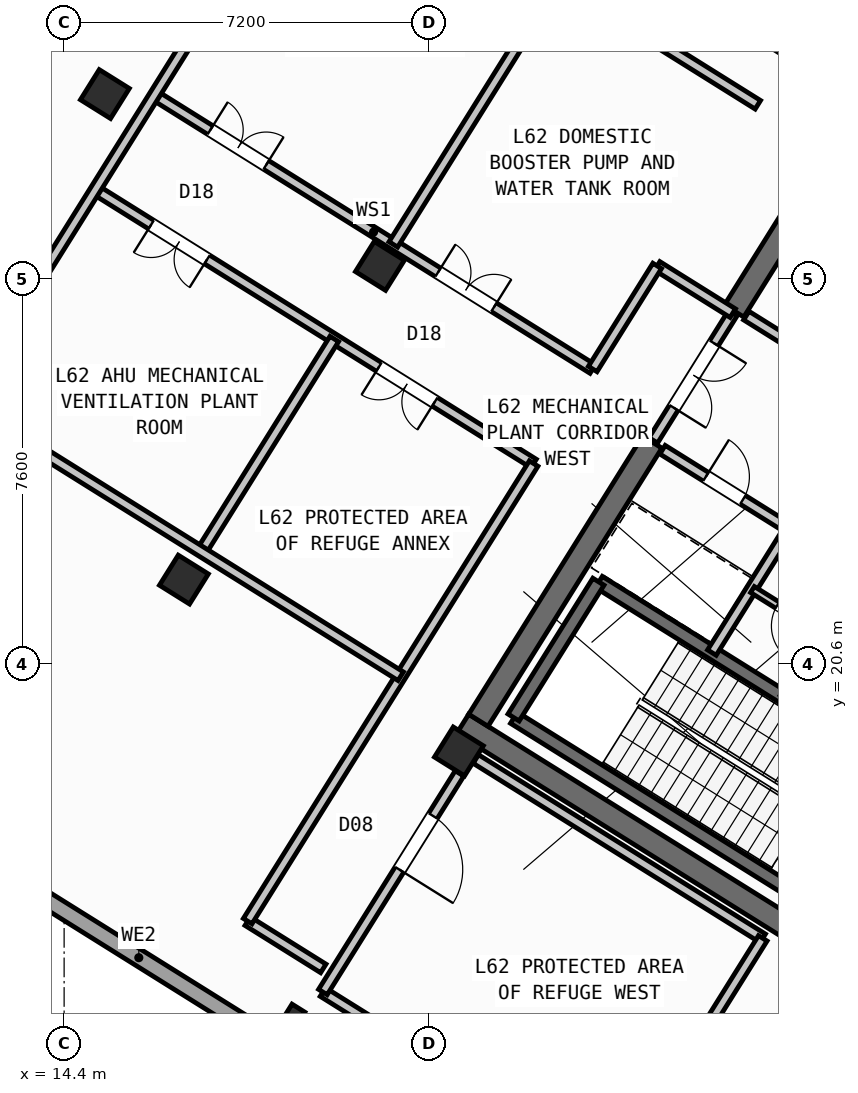
"""IFC4 building model, lengths in metres.
Left out: names, types, materials, properties, quantities, classifications, styles, units other than length and angle.
Written with IfcOpenShell. Run it as: python <this file> out.ifc"""

import sys

from ifc_helpers import new_model, si_unit, direction, frame, frame_2d, origin, origin_2d, place, context, subcontext, project, spatial, rectangle, hollow_rectangle, i_section, extrude, source, transform, mapped, element, fill, save


model = new_model("IFC4")
c1 = context("Model", 3, precision=1e-05, world=origin(), true_north=direction((0.0, 1.0)))
c2 = subcontext(c1, "Body", "Model", "MODEL_VIEW")
j1 = project(units=[si_unit("LENGTHUNIT", "METRE"), si_unit("PLANEANGLEUNIT", "RADIAN")], contexts=[c1])
p1 = place(None, origin())
s1 = spatial("IfcSite", under=j1, at=p1, CompositionType="ELEMENT")
p2 = place(p1, origin())
s2 = spatial("IfcBuilding", under=s1, at=p2, CompositionType="ELEMENT")
p3 = place(p2, frame((0.0, 0.0, 245.7)))
s3 = spatial("IfcBuildingStorey", under=s2, at=p3, CompositionType="ELEMENT", Elevation=245.7)
p4 = place(p3, frame((33.324, 12.503, 0.0), z_axis=(0.0, 0.0, 1.0), x_axis=(-0.848043529849, 0.529926571782, 0.0)))
e1 = element("IfcWall", 1, at=p4, inside=s3, PredefinedType="SHEAR", context=c2, shape_type="SweptSolid", body=[
    extrude(rectangle(XDim=13.04, YDim=0.45, at=frame_2d((6.52, 0.0))), origin(), (0.0, 0.0, 1.0), 5.15),
])
p5 = place(p3, frame((29.544, 30.636, 0.0), z_axis=(0.0, 0.0, 1.0), x_axis=(-0.529902075036, -0.848058836916, 0.0)))
e2 = element("IfcWall", 2, at=p5, inside=s3, PredefinedType="SHEAR", context=c2, shape_type="SweptSolid", body=[
    extrude(rectangle(XDim=3.625, YDim=0.45, at=frame_2d((1.812, 0.0))), origin(), (0.0, 0.0, 1.0), 5.15),
])
p6 = place(p3, frame((26.007, 24.976, 0.0), z_axis=(0.0, 0.0, 1.0), x_axis=(-0.529931155655, -0.848040665456, 0.0)))
e3 = element("IfcWall", 3, at=p6, inside=s3, PredefinedType="SHEAR", context=c2, shape_type="SweptSolid", body=[
    extrude(rectangle(XDim=6.475, YDim=0.45, at=frame_2d((3.238, 0.0))), origin(), (0.0, 0.0, 1.0), 5.15),
])
m1 = source(origin(), c2, "Body", "SweptSolid", [
    extrude(hollow_rectangle(XDim=0.7, YDim=0.7, WallThickness=0.028, at=origin_2d()), origin(), (0.0, 0.0, 1.0), 5.4),
])
p7 = place(p3, frame((22.191, 18.87, 0.0), z_axis=(0.0, 0.0, 1.0), x_axis=(-0.848048096156, 0.529919264233, 0.0)))
e4 = element("IfcColumn", 4, at=p7, inside=s3, PredefinedType="COLUMN", context=c2, shape_type="MappedRepresentation", body=[
    mapped(m1, transform((0.0, 0.0, 0.0), scale=1.0)),
])
m2 = source(origin(), c2, "Body", "SweptSolid", [
    extrude(i_section(OverallWidth=0.3, OverallDepth=0.45, WebThickness=0.014, FlangeThickness=0.026, at=origin_2d()), origin(), (0.0, 0.0, 1.0), 5.4),
])
p8 = place(p3, frame((18.906, 13.612, 0.0), z_axis=(0.0, 0.0, 1.0), x_axis=(-0.848048096156, 0.529919264233, 0.0)))
e5 = element("IfcColumn", 5, at=p8, inside=s3, PredefinedType="COLUMN", context=c2, shape_type="MappedRepresentation", body=[
    mapped(m2, transform((0.0, 0.0, 0.0), scale=1.0)),
])
for number, where, z_axis, x_axis in (
    (6, (20.632, 28.452, 0.0), (0.0, 0.0, 1.0), (-0.848, 0.53, 0.0)),
    (7, (16.764, 22.261, 0.0), (0.0, 0.0, 1.0), (-0.848, 0.53, 0.0)),
    (8, (15.205, 31.844, 0.0), (0.0, 0.0, 1.0), (-0.848, 0.53, 0.0)),
):
    element("IfcColumn", number, at=place(p3, frame(where, z_axis=z_axis, x_axis=x_axis)), inside=s3, PredefinedType="COLUMN", context=c2, shape_type="MappedRepresentation", body=[
        mapped(m1, transform((0.0, 0.0, 0.0), scale=1.0)),
    ])
p9 = place(p3, frame((29.268, 6.429, 0.0), z_axis=(0.0, 0.0, 1.0), x_axis=(-0.848049971435, 0.529916263149, 0.0)))
e9 = element("IfcWall", 9, at=p9, inside=s3, PredefinedType="STANDARD", context=c2, shape_type="SweptSolid", body=[
    extrude(rectangle(XDim=31.588, YDim=0.32, at=frame_2d((15.794, 0.0))), origin(), (0.0, 0.0, 1.0), 5.15),
])
p10 = place(p9, frame((5.782, 0.0, 0.85)))
e10 = element("IfcOpeningElement", 10, at=p10, cuts=e9, PredefinedType="OPENING", context=c2, shape_type="SweptSolid", body=[
    extrude(rectangle(XDim=1.7, YDim=1.6, at=frame_2d((0.85, 0.8))), frame((0.0, 0.17, 0.0), z_axis=(0.0, -1.0, 0.0), x_axis=(1.0, 0.0, 0.0)), (0.0, 0.0, 1.0), 0.34),
])
p11 = place(p3, frame((14.138, 41.825, 0.0), z_axis=(0.0, 0.0, 1.0), x_axis=(0.848046498049, -0.529921821731, 0.0)))
e11 = element("IfcWall", 11, at=p11, inside=s3, PredefinedType="STANDARD", context=c2, shape_type="SweptSolid", body=[
    extrude(rectangle(XDim=31.588, YDim=0.32, at=frame_2d((15.794, 0.0))), origin(), (0.0, 0.0, 1.0), 5.15),
])
p12 = place(p11, frame((2.144, 0.0, 0.85)))
e12 = element("IfcOpeningElement", 12, at=p12, cuts=e11, PredefinedType="OPENING", context=c2, shape_type="SweptSolid", body=[
    extrude(rectangle(XDim=1.7, YDim=1.6, at=frame_2d((0.85, 0.8))), frame((0.0, 0.17, 0.0), z_axis=(0.0, -1.0, 0.0), x_axis=(1.0, 0.0, 0.0)), (0.0, 0.0, 1.0), 0.34),
])
p13 = place(p11, frame((8.544, 0.0, 0.85)))
e13 = element("IfcOpeningElement", 13, at=p13, cuts=e11, PredefinedType="OPENING", context=c2, shape_type="SweptSolid", body=[
    extrude(rectangle(XDim=1.7, YDim=1.6, at=frame_2d((0.85, 0.8))), frame((0.0, 0.17, 0.0), z_axis=(0.0, -1.0, 0.0), x_axis=(1.0, 0.0, 0.0)), (0.0, 0.0, 1.0), 0.34),
])
p14 = place(p11, frame((14.944, 0.0, 0.85)))
e14 = element("IfcOpeningElement", 14, at=p14, cuts=e11, PredefinedType="OPENING", context=c2, shape_type="SweptSolid", body=[
    extrude(rectangle(XDim=1.7, YDim=1.6, at=frame_2d((0.85, 0.8))), frame((0.0, 0.17, 0.0), z_axis=(0.0, -1.0, 0.0), x_axis=(1.0, 0.0, 0.0)), (0.0, 0.0, 1.0), 0.34),
])
p15 = place(p11, frame((24.408, 0.0, 0.85)))
e15 = element("IfcOpeningElement", 15, at=p15, cuts=e11, PredefinedType="OPENING", context=c2, shape_type="SweptSolid", body=[
    extrude(rectangle(XDim=1.7, YDim=1.6, at=frame_2d((0.85, 0.8))), frame((0.0, 0.17, 0.0), z_axis=(0.0, -1.0, 0.0), x_axis=(1.0, 0.0, 0.0)), (0.0, 0.0, 1.0), 0.34),
])
p16 = place(p3, frame((29.605, 15.581, 0.0), z_axis=(0.0, 0.0, 1.0), x_axis=(-0.848036911448, 0.529937163087, 0.0)))
e16 = element("IfcWall", 16, at=p16, inside=s3, PredefinedType="SHEAR", context=c2, shape_type="SweptSolid", body=[
    extrude(rectangle(XDim=7.46, YDim=0.26, at=frame_2d((3.73, 0.0))), origin(), (0.0, 0.0, 1.0), 5.15),
])
p17 = place(p3, frame((31.28, 18.261, 0.0), z_axis=(0.0, 0.0, 1.0), x_axis=(-0.848051618787, 0.529913626805, 0.0)))
e17 = element("IfcWall", 17, at=p17, inside=s3, PredefinedType="SHEAR", context=c2, shape_type="SweptSolid", body=[
    extrude(rectangle(XDim=7.46, YDim=0.26, at=frame_2d((3.73, 0.0))), origin(), (0.0, 0.0, 1.0), 5.15),
])
p18 = place(p17, frame((0.36, 0.0, 0.0)))
e18 = element("IfcOpeningElement", 18, at=p18, cuts=e17, PredefinedType="OPENING", context=c2, shape_type="SweptSolid", body=[
    extrude(rectangle(XDim=0.86, YDim=2.05, at=frame_2d((0.43, 1.025))), frame((0.0, 0.14, 0.0), z_axis=(0.0, -1.0, 0.0), x_axis=(1.0, 0.0, 0.0)), (0.0, 0.0, 1.0), 0.28),
])
p19 = place(p3, frame((24.945, 22.22, 0.0), z_axis=(0.0, 0.0, 1.0), x_axis=(-0.529908658664, -0.84805472316, 0.0)))
e19 = element("IfcWall", 19, at=p19, inside=s3, PredefinedType="SHEAR", context=c2, shape_type="SweptSolid", body=[
    extrude(rectangle(XDim=3.16, YDim=0.26, at=frame_2d((1.58, 0.0))), origin(), (0.0, 0.0, 1.0), 5.15),
])
p20 = place(p3, frame((31.822, 24.998, 0.0), z_axis=(0.0, 0.0, 1.0), x_axis=(-0.848054125777, 0.529909614701, 0.0)))
e20 = element("IfcWall", 20, at=p20, inside=s3, PredefinedType="STANDARD", context=c2, shape_type="SweptSolid", body=[
    extrude(rectangle(XDim=4.668, YDim=0.2, at=frame_2d((2.334, 0.0))), origin(), (0.0, 0.0, 1.0), 5.14),
])
p21 = place(p20, frame((0.52, 0.0, 0.0)))
e21 = element("IfcOpeningElement", 21, at=p21, cuts=e20, PredefinedType="OPENING", context=c2, shape_type="SweptSolid", body=[
    extrude(rectangle(XDim=1.2, YDim=2.15, at=frame_2d((0.6, 1.075))), frame((0.0, 0.11, 0.0), z_axis=(0.0, -1.0, 0.0), x_axis=(1.0, 0.0, 0.0)), (0.0, 0.0, 1.0), 0.22),
])
p22 = place(p20, frame((2.54, 0.0, 0.0)))
e22 = element("IfcOpeningElement", 22, at=p22, cuts=e20, PredefinedType="OPENING", context=c2, shape_type="SweptSolid", body=[
    extrude(rectangle(XDim=1.2, YDim=2.15, at=frame_2d((0.6, 1.075))), frame((0.0, 0.11, 0.0), z_axis=(0.0, -1.0, 0.0), x_axis=(1.0, 0.0, 0.0)), (0.0, 0.0, 1.0), 0.22),
])
p23 = place(p3, frame((28.71, 23.263, 0.0), z_axis=(0.0, 0.0, 1.0), x_axis=(-0.529907497854, -0.848055448493, 0.0)))
e23 = element("IfcWall", 23, at=p23, inside=s3, PredefinedType="STANDARD", context=c2, shape_type="SweptSolid", body=[
    extrude(rectangle(XDim=2.88, YDim=0.2, at=frame_2d((1.44, 0.0))), origin(), (0.0, 0.0, 1.0), 5.14),
])
p24 = place(p3, frame((31.525, 21.504, 0.0), z_axis=(0.0, 0.0, 1.0), x_axis=(-0.848042066329, 0.529928913853, 0.0)))
e24 = element("IfcWall", 24, at=p24, inside=s3, PredefinedType="STANDARD", context=c2, shape_type="SweptSolid", body=[
    extrude(rectangle(XDim=6.268, YDim=0.2, at=frame_2d((3.134, 0.0))), origin(), (0.0, 0.0, 1.0), 5.14),
])
p25 = place(p24, frame((4.4, 0.0, 0.0)))
e25 = element("IfcOpeningElement", 25, at=p25, cuts=e24, PredefinedType="OPENING", context=c2, shape_type="SweptSolid", body=[
    extrude(rectangle(XDim=0.86, YDim=2.05, at=frame_2d((0.43, 1.025))), frame((0.0, 0.11, 0.0), z_axis=(0.0, -1.0, 0.0), x_axis=(1.0, 0.0, 0.0)), (0.0, 0.0, 1.0), 0.22),
])
p26 = place(p24, frame((0.35, 0.0, 0.0)))
e26 = element("IfcOpeningElement", 26, at=p26, cuts=e24, PredefinedType="OPENING", context=c2, shape_type="SweptSolid", body=[
    extrude(rectangle(XDim=0.86, YDim=2.05, at=frame_2d((0.43, 1.025))), frame((0.0, 0.11, 0.0), z_axis=(0.0, -1.0, 0.0), x_axis=(1.0, 0.0, 0.0)), (0.0, 0.0, 1.0), 0.22),
])
p27 = place(p3, frame((30.766, 20.327, 0.0), z_axis=(0.0, 0.0, 1.0), x_axis=(-0.848052663127, 0.529911955482, 0.0)))
e27 = element("IfcWall", 27, at=p27, inside=s3, PredefinedType="PLUMBINGWALL", context=c2, shape_type="SweptSolid", body=[
    extrude(rectangle(XDim=3.28, YDim=0.14, at=frame_2d((1.64, 0.0))), origin(), (0.0, 0.0, 1.0), 5.14),
])
p28 = place(p27, frame((0.25, 0.0, 0.0)))
e28 = element("IfcOpeningElement", 28, at=p28, cuts=e27, PredefinedType="OPENING", context=c2, shape_type="SweptSolid", body=[
    extrude(rectangle(XDim=0.78, YDim=2.05, at=frame_2d((0.39, 1.025))), frame((0.0, 0.08, 0.0), z_axis=(0.0, -1.0, 0.0), x_axis=(1.0, 0.0, 0.0)), (0.0, 0.0, 1.0), 0.16),
])
p29 = place(p27, frame((1.92, 0.0, 0.0)))
e29 = element("IfcOpeningElement", 29, at=p29, cuts=e27, PredefinedType="OPENING", context=c2, shape_type="SweptSolid", body=[
    extrude(rectangle(XDim=0.78, YDim=2.05, at=frame_2d((0.39, 1.025))), frame((0.0, 0.08, 0.0), z_axis=(0.0, -1.0, 0.0), x_axis=(1.0, 0.0, 0.0)), (0.0, 0.0, 1.0), 0.16),
])
p30 = place(p3, frame((24.832, 26.417, 0.0), z_axis=(0.0, 0.0, 1.0), x_axis=(-0.848045364107, 0.529923636401, 0.0)))
e30 = element("IfcWall", 30, at=p30, inside=s3, PredefinedType="STANDARD", context=c2, shape_type="SweptSolid", body=[
    extrude(rectangle(XDim=10.2, YDim=0.2, at=frame_2d((5.1, 0.0))), origin(), (0.0, 0.0, 1.0), 5.14),
])
p31 = place(p30, frame((2.3, 0.0, 0.0)))
e31 = element("IfcOpeningElement", 31, at=p31, cuts=e30, PredefinedType="OPENING", context=c2, shape_type="SweptSolid", body=[
    extrude(rectangle(XDim=1.3, YDim=2.15, at=frame_2d((0.65, 1.075))), frame((0.0, 0.11, 0.0), z_axis=(0.0, -1.0, 0.0), x_axis=(1.0, 0.0, 0.0)), (0.0, 0.0, 1.0), 0.22),
])
p32 = place(p30, frame((7.6, 0.0, 0.0)))
e32 = element("IfcOpeningElement", 32, at=p32, cuts=e30, PredefinedType="OPENING", context=c2, shape_type="SweptSolid", body=[
    extrude(rectangle(XDim=1.3, YDim=2.15, at=frame_2d((0.65, 1.075))), frame((0.0, 0.11, 0.0), z_axis=(0.0, -1.0, 0.0), x_axis=(1.0, 0.0, 0.0)), (0.0, 0.0, 1.0), 0.22),
])
p33 = place(p3, frame((23.666, 24.552, 0.0), z_axis=(0.0, 0.0, 1.0), x_axis=(-0.848038642463, 0.529934393004, 0.0)))
e33 = element("IfcWall", 33, at=p33, inside=s3, PredefinedType="STANDARD", context=c2, shape_type="SweptSolid", body=[
    extrude(rectangle(XDim=10.2, YDim=0.2, at=frame_2d((5.1, 0.0))), origin(), (0.0, 0.0, 1.0), 5.14),
])
p34 = place(p33, frame((2.3, 0.0, 0.0)))
e34 = element("IfcOpeningElement", 34, at=p34, cuts=e33, PredefinedType="OPENING", context=c2, shape_type="SweptSolid", body=[
    extrude(rectangle(XDim=1.3, YDim=2.15, at=frame_2d((0.65, 1.075))), frame((0.0, 0.11, 0.0), z_axis=(0.0, -1.0, 0.0), x_axis=(1.0, 0.0, 0.0)), (0.0, 0.0, 1.0), 0.22),
])
p35 = place(p33, frame((7.6, 0.0, 0.0)))
e35 = element("IfcOpeningElement", 35, at=p35, cuts=e33, PredefinedType="OPENING", context=c2, shape_type="SweptSolid", body=[
    extrude(rectangle(XDim=1.3, YDim=2.15, at=frame_2d((0.65, 1.075))), frame((0.0, 0.11, 0.0), z_axis=(0.0, -1.0, 0.0), x_axis=(1.0, 0.0, 0.0)), (0.0, 0.0, 1.0), 0.22),
])
p36 = place(p3, frame((19.441, 37.038, 0.0), z_axis=(0.0, 0.0, 1.0), x_axis=(-0.529936237412, -0.848037489901, 0.0)))
e36 = element("IfcWall", 36, at=p36, inside=s3, PredefinedType="STANDARD", context=c2, shape_type="SweptSolid", body=[
    extrude(rectangle(XDim=13.3, YDim=0.2, at=frame_2d((6.65, 0.0))), origin(), (0.0, 0.0, 1.0), 5.14),
])
p37 = place(p3, frame((27.596, 27.52, 0.0), z_axis=(0.0, 0.0, 1.0), x_axis=(-0.529865479138, -0.848081702443, 0.0)))
e37 = element("IfcWall", 37, at=p37, inside=s3, PredefinedType="STANDARD", context=c2, shape_type="SweptSolid", body=[
    extrude(rectangle(XDim=2.96, YDim=0.2, at=frame_2d((1.48, 0.0))), origin(), (0.0, 0.0, 1.0), 5.14),
])
p38 = place(p37, frame((0.7, 0.0, 0.0)))
e38 = element("IfcOpeningElement", 38, at=p38, cuts=e37, PredefinedType="OPENING", context=c2, shape_type="SweptSolid", body=[
    extrude(rectangle(XDim=1.5, YDim=2.15, at=frame_2d((0.75, 1.075))), frame((0.0, 0.11, 0.0), z_axis=(0.0, -1.0, 0.0), x_axis=(1.0, 0.0, 0.0)), (0.0, 0.0, 1.0), 0.22),
])
p39 = place(p3, frame((28.188, 15.182, 0.0), z_axis=(0.0, 0.0, 1.0), x_axis=(-0.848049646362, 0.529916783378, 0.0)))
e39 = element("IfcWall", 39, at=p39, inside=s3, PredefinedType="STANDARD", context=c2, shape_type="SweptSolid", body=[
    extrude(rectangle(XDim=6.678, YDim=0.2, at=frame_2d((3.339, 0.0))), origin(), (0.0, 0.0, 1.0), 5.14),
])
p40 = place(p3, frame((25.273, 10.517, 0.0), z_axis=(0.0, 0.0, 1.0), x_axis=(-0.848048724775, 0.529918258231, 0.0)))
e40 = element("IfcWall", 40, at=p40, inside=s3, PredefinedType="STANDARD", context=c2, shape_type="SweptSolid", body=[
    extrude(rectangle(XDim=6.8, YDim=0.2, at=frame_2d((3.4, 0.0))), origin(), (0.0, 0.0, 1.0), 5.14),
])
p41 = place(p3, frame((28.188, 15.182, 0.0), z_axis=(0.0, 0.0, 1.0), x_axis=(-0.52991514706, -0.848050668838, 0.0)))
e41 = element("IfcWall", 41, at=p41, inside=s3, PredefinedType="STANDARD", context=c2, shape_type="SweptSolid", body=[
    extrude(rectangle(XDim=5.5, YDim=0.2, at=frame_2d((2.75, 0.0))), origin(), (0.0, 0.0, 1.0), 5.14),
])
p42 = place(p3, frame((22.203, 18.436, 0.0), z_axis=(0.0, 0.0, 1.0), x_axis=(-0.529921302798, -0.848046822316, 0.0)))
e42 = element("IfcWall", 42, at=p42, inside=s3, PredefinedType="STANDARD", context=c2, shape_type="SweptSolid", body=[
    extrude(rectangle(XDim=5.088, YDim=0.2, at=frame_2d((2.544, 0.0))), origin(), (0.0, 0.0, 1.0), 4.675),
])
p43 = place(p42, frame((0.988, 0.0, 0.0)))
e43 = element("IfcOpeningElement", 43, at=p43, cuts=e42, PredefinedType="OPENING", context=c2, shape_type="SweptSolid", body=[
    extrude(rectangle(XDim=1.25, YDim=2.15, at=frame_2d((0.625, 1.075))), frame((0.0, 0.11, 0.0), z_axis=(0.0, -1.0, 0.0), x_axis=(1.0, 0.0, 0.0)), (0.0, 0.0, 1.0), 0.22),
])
p44 = place(p3, frame((27.596, 27.52, 0.0), z_axis=(0.0, 0.0, 1.0), x_axis=(-0.848037269931, 0.529936589422, 0.0)))
e44 = element("IfcWall", 44, at=p44, inside=s3, PredefinedType="STANDARD", context=c2, shape_type="SweptSolid", body=[
    extrude(rectangle(XDim=1.76, YDim=0.2, at=frame_2d((0.88, 0.0))), origin(), (0.0, 0.0, 1.0), 5.14),
])
p45 = place(p3, frame((19.515, 14.587, 0.0), z_axis=(0.0, 0.0, 1.0), x_axis=(-0.848076222107, 0.529874250646, 0.0)))
e45 = element("IfcWall", 45, at=p45, inside=s3, PredefinedType="STANDARD", context=c2, shape_type="SweptSolid", body=[
    extrude(rectangle(XDim=1.76, YDim=0.2, at=frame_2d((0.88, 0.0))), origin(), (0.0, 0.0, 1.0), 5.14),
])
p46 = place(p3, frame((26.104, 28.453, 0.0), z_axis=(0.0, 0.0, 1.0), x_axis=(-0.529880066358, -0.848072588448, 0.0)))
e46 = element("IfcWall", 46, at=p46, inside=s3, PredefinedType="STANDARD", context=c2, shape_type="SweptSolid", body=[
    extrude(rectangle(XDim=2.4, YDim=0.2, at=frame_2d((1.2, 0.0))), origin(), (0.0, 0.0, 1.0), 5.14),
])
p47 = place(p3, frame((23.666, 24.552, 0.0), z_axis=(0.0, 0.0, 1.0), x_axis=(-0.529912392506, -0.848052390049, 0.0)))
e47 = element("IfcWall", 47, at=p47, inside=s3, PredefinedType="STANDARD", context=c2, shape_type="SweptSolid", body=[
    extrude(rectangle(XDim=10.65, YDim=0.2, at=frame_2d((5.325, 0.0))), origin(), (0.0, 0.0, 1.0), 5.14),
])
p48 = place(p3, frame((19.731, 27.01, 0.0), z_axis=(0.0, 0.0, 1.0), x_axis=(-0.529896970672, -0.848062026312, 0.0)))
e48 = element("IfcWall", 48, at=p48, inside=s3, PredefinedType="STANDARD", context=c2, shape_type="SweptSolid", body=[
    extrude(rectangle(XDim=4.95, YDim=0.2, at=frame_2d((2.475, 0.0))), origin(), (0.0, 0.0, 1.0), 4.675),
])
p49 = place(p3, frame((24.156, 34.092, 0.0), z_axis=(0.0, 0.0, 1.0), x_axis=(-0.529934707271, -0.84803844608, 0.0)))
e49 = element("IfcWall", 49, at=p49, inside=s3, PredefinedType="STANDARD", context=c2, shape_type="SweptSolid", body=[
    extrude(rectangle(XDim=6.15, YDim=0.2, at=frame_2d((3.075, 0.0))), origin(), (0.0, 0.0, 1.0), 4.675),
])
p50 = place(p3, frame((21.043, 20.354, 0.0), z_axis=(0.0, 0.0, 1.0), x_axis=(-0.848045364107, 0.529923636401, 0.0)))
e50 = element("IfcWall", 50, at=p50, inside=s3, PredefinedType="STANDARD", context=c2, shape_type="SweptSolid", body=[
    extrude(rectangle(XDim=10.2, YDim=0.2, at=frame_2d((5.1, 0.0))), origin(), (0.0, 0.0, 1.0), 5.14),
])
p51 = place(p3, frame((28.091, 31.633, 0.0), z_axis=(0.0, 0.0, 1.0), x_axis=(-0.848049399204, 0.529917178916, 0.0)))
e51 = element("IfcWall", 51, at=p51, inside=s3, PredefinedType="STANDARD", context=c2, shape_type="SweptSolid", body=[
    extrude(rectangle(XDim=10.2, YDim=0.2, at=frame_2d((5.1, 0.0))), origin(), (0.0, 0.0, 1.0), 5.14),
])
m3 = source(origin(), c2, "Body", "SweptSolid", [
    extrude(rectangle(XDim=0.86, YDim=2.05, at=frame_2d((0.43, 1.025))), frame((0.0, 0.025, 0.0), z_axis=(0.0, -1.0, 0.0), x_axis=(1.0, 0.0, 0.0)), (0.0, 0.0, 1.0), 0.05),
])
p52 = place(p25, frame((0.86, 0.0, 0.0), z_axis=(0.0, 0.0, 1.0), x_axis=(-1.0, 0.0, 0.0)))
e52 = element("IfcDoor", 52, at=p52, inside=s3, OperationType="SINGLE_SWING_LEFT", PredefinedType="DOOR", context=c2, shape_type="MappedRepresentation", body=[
    mapped(m3, transform((0.0, 0.0, 0.0), scale=1.0)),
])
fill(e25, e52)
m4 = source(origin(), c2, "Body", "SweptSolid", [
    extrude(rectangle(XDim=0.78, YDim=2.05, at=frame_2d((0.39, 1.025))), frame((0.0, 0.025, 0.0), z_axis=(0.0, -1.0, 0.0), x_axis=(1.0, 0.0, 0.0)), (0.0, 0.0, 1.0), 0.05),
])
p53 = place(p29, origin())
e53 = element("IfcDoor", 53, at=p53, inside=s3, OperationType="SINGLE_SWING_LEFT", PredefinedType="DOOR", context=c2, shape_type="MappedRepresentation", body=[
    mapped(m4, transform((0.0, 0.0, 0.0), scale=1.0)),
])
fill(e29, e53)
m5 = source(origin(), c2, "Body", "SweptSolid", [
    extrude(rectangle(XDim=1.5, YDim=2.15, at=frame_2d((0.75, 1.075))), frame((0.0, 0.025, 0.0), z_axis=(0.0, -1.0, 0.0), x_axis=(1.0, 0.0, 0.0)), (0.0, 0.0, 1.0), 0.05),
])
p54 = place(p38, origin())
e54 = element("IfcDoor", 54, at=p54, inside=s3, OperationType="DOUBLE_DOOR_SINGLE_SWING", PredefinedType="DOOR", context=c2, shape_type="MappedRepresentation", body=[
    mapped(m5, transform((0.0, 0.0, 0.0), scale=1.0)),
])
fill(e38, e54)
m6 = source(origin(), c2, "Body", "SweptSolid", [
    extrude(rectangle(XDim=1.25, YDim=2.15, at=frame_2d((0.625, 1.075))), frame((0.0, 0.025, 0.0), z_axis=(0.0, -1.0, 0.0), x_axis=(1.0, 0.0, 0.0)), (0.0, 0.0, 1.0), 0.05),
])
p55 = place(p43, origin())
e55 = element("IfcDoor", 55, at=p55, inside=s3, OperationType="SINGLE_SWING_RIGHT", PredefinedType="DOOR", context=c2, shape_type="MappedRepresentation", body=[
    mapped(m6, transform((0.0, 0.0, 0.0), scale=1.0)),
])
fill(e43, e55)
m7 = source(origin(), c2, "Body", "SweptSolid", [
    extrude(rectangle(XDim=1.3, YDim=2.15, at=frame_2d((0.65, 1.075))), frame((0.0, 0.025, 0.0), z_axis=(0.0, -1.0, 0.0), x_axis=(1.0, 0.0, 0.0)), (0.0, 0.0, 1.0), 0.05),
])
p56 = place(p34, origin())
e56 = element("IfcDoor", 56, at=p56, inside=s3, OperationType="DOUBLE_DOOR_SINGLE_SWING", PredefinedType="DOOR", context=c2, shape_type="MappedRepresentation", body=[
    mapped(m7, transform((0.0, 0.0, 0.0), scale=1.0)),
])
fill(e34, e56)
p57 = place(p35, origin())
e57 = element("IfcDoor", 57, at=p57, inside=s3, OperationType="DOUBLE_DOOR_SINGLE_SWING", PredefinedType="DOOR", context=c2, shape_type="MappedRepresentation", body=[
    mapped(m7, transform((0.0, 0.0, 0.0), scale=1.0)),
])
fill(e35, e57)
p58 = place(p31, frame((1.3, 0.0, 0.0), z_axis=(0.0, 0.0, 1.0), x_axis=(-1.0, 0.0, 0.0)))
e58 = element("IfcDoor", 58, at=p58, inside=s3, OperationType="DOUBLE_DOOR_SINGLE_SWING", PredefinedType="DOOR", context=c2, shape_type="MappedRepresentation", body=[
    mapped(m7, transform((0.0, 0.0, 0.0), scale=1.0)),
])
fill(e31, e58)
p59 = place(p32, frame((1.3, 0.0, 0.0), z_axis=(0.0, 0.0, 1.0), x_axis=(-1.0, 0.0, 0.0)))
e59 = element("IfcDoor", 59, at=p59, inside=s3, OperationType="DOUBLE_DOOR_SINGLE_SWING", PredefinedType="DOOR", context=c2, shape_type="MappedRepresentation", body=[
    mapped(m7, transform((0.0, 0.0, 0.0), scale=1.0)),
])
fill(e32, e59)
save(model, sys.argv[1])
